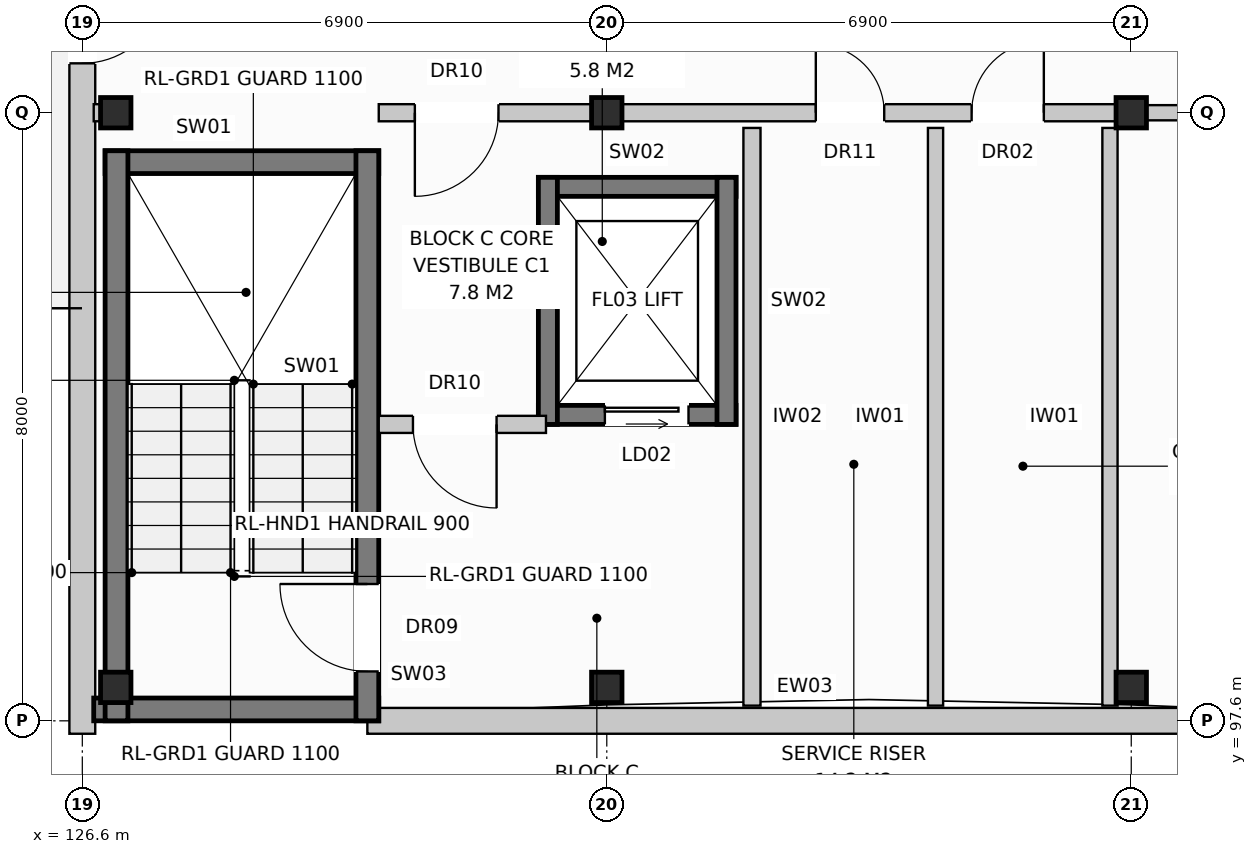
"""IFC4 building model, lengths in metres.
Left out: names, types, materials, properties, quantities, classifications, styles, units other than length and angle.
Written with IfcOpenShell. Run it as: python <this file> out.ifc"""

import sys

from ifc_helpers import new_model, si_unit, direction, frame, frame_2d, origin, origin_with_axes, origin_2d, place, context, subcontext, project, spatial, rectangle, extrude, element, fill, save


model = new_model("IFC4")
c1 = context("Model", 3, precision=1e-05, world=origin(), true_north=direction((0.0, 1.0)))
c2 = subcontext(c1, "Body", "Model", "MODEL_VIEW")
j1 = project(units=[si_unit("LENGTHUNIT", "METRE"), si_unit("PLANEANGLEUNIT", "RADIAN")], contexts=[c1])
p1 = place(None, origin())
s1 = spatial("IfcSite", under=j1, at=p1, CompositionType="ELEMENT")
p2 = place(p1, origin())
s2 = spatial("IfcBuilding", under=s1, at=p2, CompositionType="ELEMENT")
p3 = place(p2, frame((0.0, 0.0, 27.2)))
s3 = spatial("IfcBuildingStorey", under=s2, at=p3, CompositionType="ELEMENT", Elevation=27.2)
for number, where, z_axis, x_axis in (
    (1, (127.04, 98.04, 0.0), (0.0, 0.0, 1.0), (1.0, 0.0, 0.0)),
    (2, (127.04, 105.6, 0.0), (0.0, 0.0, 1.0), (1.0, 0.0, 0.0)),
    (3, (133.5, 98.04, 0.0), (0.0, 0.0, 1.0), (1.0, 0.0, 0.0)),
    (4, (133.5, 105.6, 0.0), (0.0, 0.0, 1.0), (1.0, 0.0, 0.0)),
    (5, (140.4, 98.04, 0.0), (0.0, 0.0, 1.0), (1.0, 0.0, 0.0)),
    (6, (140.4, 105.6, 0.0), (0.0, 0.0, 1.0), (1.0, 0.0, 0.0)),
):
    element("IfcColumn", number, at=place(p3, frame(where, z_axis=z_axis, x_axis=x_axis)), inside=s3, PredefinedType="COLUMN", context=c2, shape_type="SweptSolid", body=[
        extrude(rectangle(XDim=0.4, YDim=0.4, at=origin_2d()), origin(), (0.0, 0.0, 1.0), 3.2),
    ])
p4 = place(p3, frame((130.35, 97.6, 0.0), z_axis=(0.0, 0.0, 1.0), x_axis=(1.0, 0.0, 0.0)))
e7 = element("IfcWall", 7, at=p4, inside=s3, PredefinedType="STANDARD", context=c2, shape_type="SweptSolid", body=[
    extrude(rectangle(XDim=17.4, YDim=0.34, at=frame_2d((8.7, 0.0))), origin(), (0.0, 0.0, 1.0), 2.96),
])
p5 = place(p4, frame((11.82, 0.0, 0.0)))
e8 = element("IfcOpeningElement", 8, at=p5, cuts=e7, PredefinedType="OPENING", context=c2, shape_type="SweptSolid", body=[
    extrude(rectangle(XDim=1.05, YDim=2.12, at=frame_2d((0.525, 1.06))), frame((0.0, 0.182, 0.0), z_axis=(0.0, -1.0, 0.0), x_axis=(1.0, 0.0, 0.0)), (0.0, 0.0, 1.0), 0.364),
])
p6 = place(p4, frame((14.87, 0.0, 0.72)))
e9 = element("IfcOpeningElement", 9, at=p6, cuts=e7, PredefinedType="OPENING", context=c2, shape_type="SweptSolid", body=[
    extrude(rectangle(XDim=1.1, YDim=1.5, at=frame_2d((0.55, 0.75))), frame((0.0, 0.182, 0.0), z_axis=(0.0, -1.0, 0.0), x_axis=(1.0, 0.0, 0.0)), (0.0, 0.0, 1.0), 0.364),
])
p7 = place(p3, frame((126.6, 97.43, 0.0), z_axis=(0.0, 0.0, 1.0), x_axis=(0.0, 1.0, 0.0)))
e10 = element("IfcWall", 10, at=p7, inside=s3, PredefinedType="STANDARD", context=c2, shape_type="SweptSolid", body=[
    extrude(rectangle(XDim=18.74, YDim=0.34, at=frame_2d((9.37, 0.0))), origin(), (0.0, 0.0, 1.0), 2.96),
])
p8 = place(p7, frame((8.82, 0.0, 0.0)))
e11 = element("IfcOpeningElement", 11, at=p8, cuts=e10, PredefinedType="OPENING", context=c2, shape_type="SweptSolid", body=[
    extrude(rectangle(XDim=1.1, YDim=2.1, at=frame_2d((0.55, 1.05))), frame((0.0, 0.182, 0.0), z_axis=(0.0, -1.0, 0.0), x_axis=(1.0, 0.0, 0.0)), (0.0, 0.0, 1.0), 0.364),
])
p9 = place(p7, frame((15.92, 0.0, 0.72)))
e12 = element("IfcOpeningElement", 12, at=p9, cuts=e10, PredefinedType="OPENING", context=c2, shape_type="SweptSolid", body=[
    extrude(rectangle(XDim=1.1, YDim=1.5, at=frame_2d((0.55, 0.75))), frame((0.0, 0.182, 0.0), z_axis=(0.0, -1.0, 0.0), x_axis=(1.0, 0.0, 0.0)), (0.0, 0.0, 1.0), 0.364),
])
p10 = place(p3, frame((126.75, 97.75, 0.0), z_axis=(0.0, 0.0, 1.0), x_axis=(1.0, 0.0, 0.0)))
e13 = element("IfcWall", 13, at=p10, inside=s3, PredefinedType="SHEAR", context=c2, shape_type="SweptSolid", body=[
    extrude(rectangle(XDim=3.75, YDim=0.3, at=frame_2d((1.875, 0.0))), origin(), (0.0, 0.0, 1.0), 2.96),
])
p11 = place(p3, frame((126.9, 104.95, 0.0), z_axis=(0.0, 0.0, 1.0), x_axis=(1.0, 0.0, 0.0)))
e14 = element("IfcWall", 14, at=p11, inside=s3, PredefinedType="SHEAR", context=c2, shape_type="SweptSolid", body=[
    extrude(rectangle(XDim=3.6, YDim=0.3, at=frame_2d((1.8, 0.0))), origin(), (0.0, 0.0, 1.0), 2.96),
])
p12 = place(p3, frame((127.05, 97.6, 0.0), z_axis=(0.0, 0.0, 1.0), x_axis=(0.0, 1.0, 0.0)))
e15 = element("IfcWall", 15, at=p12, inside=s3, PredefinedType="SHEAR", context=c2, shape_type="SweptSolid", body=[
    extrude(rectangle(XDim=7.5, YDim=0.3, at=frame_2d((3.75, 0.0))), origin(), (0.0, 0.0, 1.0), 2.96),
])
p13 = place(p3, frame((130.35, 97.6, 0.0), z_axis=(0.0, 0.0, 1.0), x_axis=(0.0, 1.0, 0.0)))
e16 = element("IfcWall", 16, at=p13, inside=s3, PredefinedType="SHEAR", context=c2, shape_type="SweptSolid", body=[
    extrude(rectangle(XDim=7.5, YDim=0.3, at=frame_2d((3.75, 0.0))), origin(), (0.0, 0.0, 1.0), 2.96),
])
p14 = place(p13, frame((0.65, 0.0, 0.0)))
e17 = element("IfcOpeningElement", 17, at=p14, cuts=e16, PredefinedType="OPENING", context=c2, shape_type="SweptSolid", body=[
    extrude(rectangle(XDim=1.15, YDim=2.15, at=frame_2d((0.575, 1.075))), frame((0.0, 0.162, 0.0), z_axis=(0.0, -1.0, 0.0), x_axis=(1.0, 0.0, 0.0)), (0.0, 0.0, 1.0), 0.324),
])
p15 = place(p3, frame((132.6, 101.625, 0.0), z_axis=(0.0, 0.0, 1.0), x_axis=(1.0, 0.0, 0.0)))
e18 = element("IfcWall", 18, at=p15, inside=s3, PredefinedType="SHEAR", context=c2, shape_type="SweptSolid", body=[
    extrude(rectangle(XDim=2.6, YDim=0.25, at=frame_2d((1.3, 0.0))), origin(), (0.0, 0.0, 1.0), 2.96),
])
p16 = place(p15, frame((0.875, 0.0, 0.0)))
e19 = element("IfcOpeningElement", 19, at=p16, cuts=e18, PredefinedType="OPENING", context=c2, shape_type="SweptSolid", body=[
    extrude(rectangle(XDim=1.1, YDim=2.1, at=frame_2d((0.55, 1.05))), frame((0.0, 0.137, 0.0), z_axis=(0.0, -1.0, 0.0), x_axis=(1.0, 0.0, 0.0)), (0.0, 0.0, 1.0), 0.274),
])
p17 = place(p3, frame((132.6, 104.625, 0.0), z_axis=(0.0, 0.0, 1.0), x_axis=(1.0, 0.0, 0.0)))
e20 = element("IfcWall", 20, at=p17, inside=s3, PredefinedType="SHEAR", context=c2, shape_type="SweptSolid", body=[
    extrude(rectangle(XDim=2.6, YDim=0.25, at=frame_2d((1.3, 0.0))), origin(), (0.0, 0.0, 1.0), 2.96),
])
for number, where, z_axis, x_axis in (
    (21, (132.725, 101.5, 0.0), (0.0, 0.0, 1.0), (0.0, 1.0, 0.0)),
    (22, (135.075, 101.5, 0.0), (0.0, 0.0, 1.0), (0.0, 1.0, 0.0)),
):
    element("IfcWall", number, at=place(p3, frame(where, z_axis=z_axis, x_axis=x_axis)), inside=s3, PredefinedType="SHEAR", context=c2, shape_type="SweptSolid", body=[
        extrude(rectangle(XDim=3.25, YDim=0.25, at=frame_2d((1.625, 0.0))), origin(), (0.0, 0.0, 1.0), 2.96),
    ])
p18 = place(p3, frame((135.41, 97.8, 0.0), z_axis=(0.0, 0.0, 1.0), x_axis=(0.0, 1.0, 0.0)))
e23 = element("IfcWall", 23, at=p18, inside=s3, PredefinedType="PARTITIONING", context=c2, shape_type="SweptSolid", body=[
    extrude(rectangle(XDim=7.6, YDim=0.225, at=frame_2d((3.8, 0.0))), origin(), (0.0, 0.0, 1.0), 2.59),
])
p19 = place(p3, frame((130.5, 101.5, 0.0), z_axis=(0.0, 0.0, 1.0), x_axis=(1.0, 0.0, 0.0)))
e24 = element("IfcWall", 24, at=p19, inside=s3, PredefinedType="PARTITIONING", context=c2, shape_type="SweptSolid", body=[
    extrude(rectangle(XDim=2.2, YDim=0.225, at=frame_2d((1.1, 0.0))), origin(), (0.0, 0.0, 1.0), 2.96),
])
p20 = place(p19, frame((0.45, 0.0, 0.0)))
e25 = element("IfcOpeningElement", 25, at=p20, cuts=e24, PredefinedType="OPENING", context=c2, shape_type="SweptSolid", body=[
    extrude(rectangle(XDim=1.1, YDim=2.15, at=frame_2d((0.55, 1.075))), frame((0.0, 0.125, 0.0), z_axis=(0.0, -1.0, 0.0), x_axis=(1.0, 0.0, 0.0)), (0.0, 0.0, 1.0), 0.249),
])
p21 = place(p3, frame((126.75, 105.6, 0.0), z_axis=(0.0, 0.0, 1.0), x_axis=(1.0, 0.0, 0.0)))
e26 = element("IfcWall", 26, at=p21, inside=s3, PredefinedType="PARTITIONING", context=c2, shape_type="SweptSolid", body=[
    extrude(rectangle(XDim=0.15, YDim=0.225, at=frame_2d((0.075, 0.0))), origin(), (0.0, 0.0, 1.0), 2.96),
])
for number, where, z_axis, x_axis in (
    (27, (137.825, 97.8, 0.0), (0.0, 0.0, 1.0), (0.0, 1.0, 0.0)),
    (28, (140.12, 97.8, 0.0), (0.0, 0.0, 1.0), (0.0, 1.0, 0.0)),
):
    element("IfcWall", number, at=place(p3, frame(where, z_axis=z_axis, x_axis=x_axis)), inside=s3, PredefinedType="PARTITIONING", context=c2, shape_type="SweptSolid", body=[
        extrude(rectangle(XDim=7.6, YDim=0.2, at=frame_2d((3.8, 0.0))), origin(), (0.0, 0.0, 1.0), 2.96),
    ])
p22 = place(p3, frame((130.5, 105.6, 0.0), z_axis=(0.0, 0.0, 1.0), x_axis=(1.0, 0.0, 0.0)))
e29 = element("IfcWall", 29, at=p22, inside=s3, PredefinedType="PARTITIONING", context=c2, shape_type="SweptSolid", body=[
    extrude(rectangle(XDim=9.9, YDim=0.225, at=frame_2d((4.95, 0.0))), origin(), (0.0, 0.0, 1.0), 2.4),
])
p23 = place(p22, frame((0.475, 0.0, 0.0)))
e30 = element("IfcOpeningElement", 30, at=p23, cuts=e29, PredefinedType="OPENING", context=c2, shape_type="SweptSolid", body=[
    extrude(rectangle(XDim=1.1, YDim=2.15, at=frame_2d((0.55, 1.075))), frame((0.0, 0.125, 0.0), z_axis=(0.0, -1.0, 0.0), x_axis=(1.0, 0.0, 0.0)), (0.0, 0.0, 1.0), 0.249),
])
p24 = place(p22, frame((5.75, 0.0, 0.0)))
e31 = element("IfcOpeningElement", 31, at=p24, cuts=e29, PredefinedType="OPENING", context=c2, shape_type="SweptSolid", body=[
    extrude(rectangle(XDim=0.9, YDim=2.1, at=frame_2d((0.45, 1.05))), frame((0.0, 0.125, 0.0), z_axis=(0.0, -1.0, 0.0), x_axis=(1.0, 0.0, 0.0)), (0.0, 0.0, 1.0), 0.249),
])
p25 = place(p22, frame((7.8, 0.0, 0.0)))
e32 = element("IfcOpeningElement", 32, at=p25, cuts=e29, PredefinedType="OPENING", context=c2, shape_type="SweptSolid", body=[
    extrude(rectangle(XDim=0.95, YDim=2.15, at=frame_2d((0.475, 1.075))), frame((0.0, 0.125, 0.0), z_axis=(0.0, -1.0, 0.0), x_axis=(1.0, 0.0, 0.0)), (0.0, 0.0, 1.0), 0.249),
])
p26 = place(p3, frame((140.4, 105.6, 0.0), z_axis=(0.0, 0.0, 1.0), x_axis=(1.0, 0.0, 0.0)))
e33 = element("IfcWall", 33, at=p26, inside=s3, PredefinedType="PARTITIONING", context=c2, shape_type="SweptSolid", body=[
    extrude(rectangle(XDim=6.9, YDim=0.2, at=frame_2d((3.45, 0.0))), origin(), (0.0, 0.0, 1.0), 2.4),
])
p27 = place(p26, frame((2.0, 0.0, 0.0)))
e34 = element("IfcOpeningElement", 34, at=p27, cuts=e33, PredefinedType="OPENING", context=c2, shape_type="SweptSolid", body=[
    extrude(rectangle(XDim=0.95, YDim=2.15, at=frame_2d((0.475, 1.075))), frame((0.0, 0.112, 0.0), z_axis=(0.0, -1.0, 0.0), x_axis=(1.0, 0.0, 0.0)), (0.0, 0.0, 1.0), 0.224),
])
p28 = place(p8, frame((1.1, 0.0, 0.0), z_axis=(0.0, 0.0, 1.0), x_axis=(-1.0, 0.0, 0.0)))
e35 = element("IfcDoor", 35, at=p28, inside=s3, OperationType="SINGLE_SWING_RIGHT", PredefinedType="DOOR", context=c2, shape_type="SweptSolid", body=[
    extrude(rectangle(XDim=1.1, YDim=2.1, at=frame_2d((0.55, 1.05))), frame((0.0, 0.025, 0.0), z_axis=(0.0, -1.0, 0.0), x_axis=(1.0, 0.0, 0.0)), (0.0, 0.0, 1.0), 0.05),
])
fill(e11, e35)
p29 = place(p14, origin_with_axes())
e36 = element("IfcDoor", 36, at=p29, inside=s3, OperationType="SINGLE_SWING_RIGHT", PredefinedType="DOOR", context=c2, shape_type="SweptSolid", body=[
    extrude(rectangle(XDim=1.15, YDim=2.15, at=frame_2d((0.575, 1.075))), frame((0.0, 0.025, 0.0), z_axis=(0.0, -1.0, 0.0), x_axis=(1.0, 0.0, 0.0)), (0.0, 0.0, 1.0), 0.05),
])
fill(e17, e36)
p30 = place(p16, origin_with_axes())
e37 = element("IfcDoor", 37, at=p30, inside=s3, OperationType="SLIDING_TO_LEFT", PredefinedType="DOOR", context=c2, shape_type="SweptSolid", body=[
    extrude(rectangle(XDim=1.1, YDim=2.1, at=frame_2d((0.55, 1.05))), frame((0.0, 0.025, 0.0), z_axis=(0.0, -1.0, 0.0), x_axis=(1.0, 0.0, 0.0)), (0.0, 0.0, 1.0), 0.05),
])
fill(e19, e37)
p31 = place(p20, frame((1.1, 0.0, 0.0), z_axis=(0.0, 0.0, 1.0), x_axis=(-1.0, 0.0, 0.0)))
e38 = element("IfcDoor", 38, at=p31, inside=s3, OperationType="SINGLE_SWING_RIGHT", PredefinedType="DOOR", context=c2, shape_type="SweptSolid", body=[
    extrude(rectangle(XDim=1.1, YDim=2.15, at=frame_2d((0.55, 1.075))), frame((0.0, 0.025, 0.0), z_axis=(0.0, -1.0, 0.0), x_axis=(1.0, 0.0, 0.0)), (0.0, 0.0, 1.0), 0.05),
])
fill(e25, e38)
p32 = place(p23, frame((1.1, 0.0, 0.0), z_axis=(0.0, 0.0, 1.0), x_axis=(-1.0, 0.0, 0.0)))
e39 = element("IfcDoor", 39, at=p32, inside=s3, OperationType="SINGLE_SWING_LEFT", PredefinedType="DOOR", context=c2, shape_type="SweptSolid", body=[
    extrude(rectangle(XDim=1.1, YDim=2.15, at=frame_2d((0.55, 1.075))), frame((0.0, 0.025, 0.0), z_axis=(0.0, -1.0, 0.0), x_axis=(1.0, 0.0, 0.0)), (0.0, 0.0, 1.0), 0.05),
])
fill(e30, e39)
p33 = place(p24, origin_with_axes())
e40 = element("IfcDoor", 40, at=p33, inside=s3, OperationType="SINGLE_SWING_LEFT", PredefinedType="DOOR", context=c2, shape_type="SweptSolid", body=[
    extrude(rectangle(XDim=0.9, YDim=2.1, at=frame_2d((0.45, 1.05))), frame((0.0, 0.025, 0.0), z_axis=(0.0, -1.0, 0.0), x_axis=(1.0, 0.0, 0.0)), (0.0, 0.0, 1.0), 0.05),
])
fill(e31, e40)
p34 = place(p25, origin_with_axes())
e41 = element("IfcDoor", 41, at=p34, inside=s3, OperationType="SINGLE_SWING_RIGHT", PredefinedType="DOOR", context=c2, shape_type="SweptSolid", body=[
    extrude(rectangle(XDim=0.95, YDim=2.15, at=frame_2d((0.475, 1.075))), frame((0.0, 0.025, 0.0), z_axis=(0.0, -1.0, 0.0), x_axis=(1.0, 0.0, 0.0)), (0.0, 0.0, 1.0), 0.05),
])
fill(e32, e41)
save(model, sys.argv[1])
